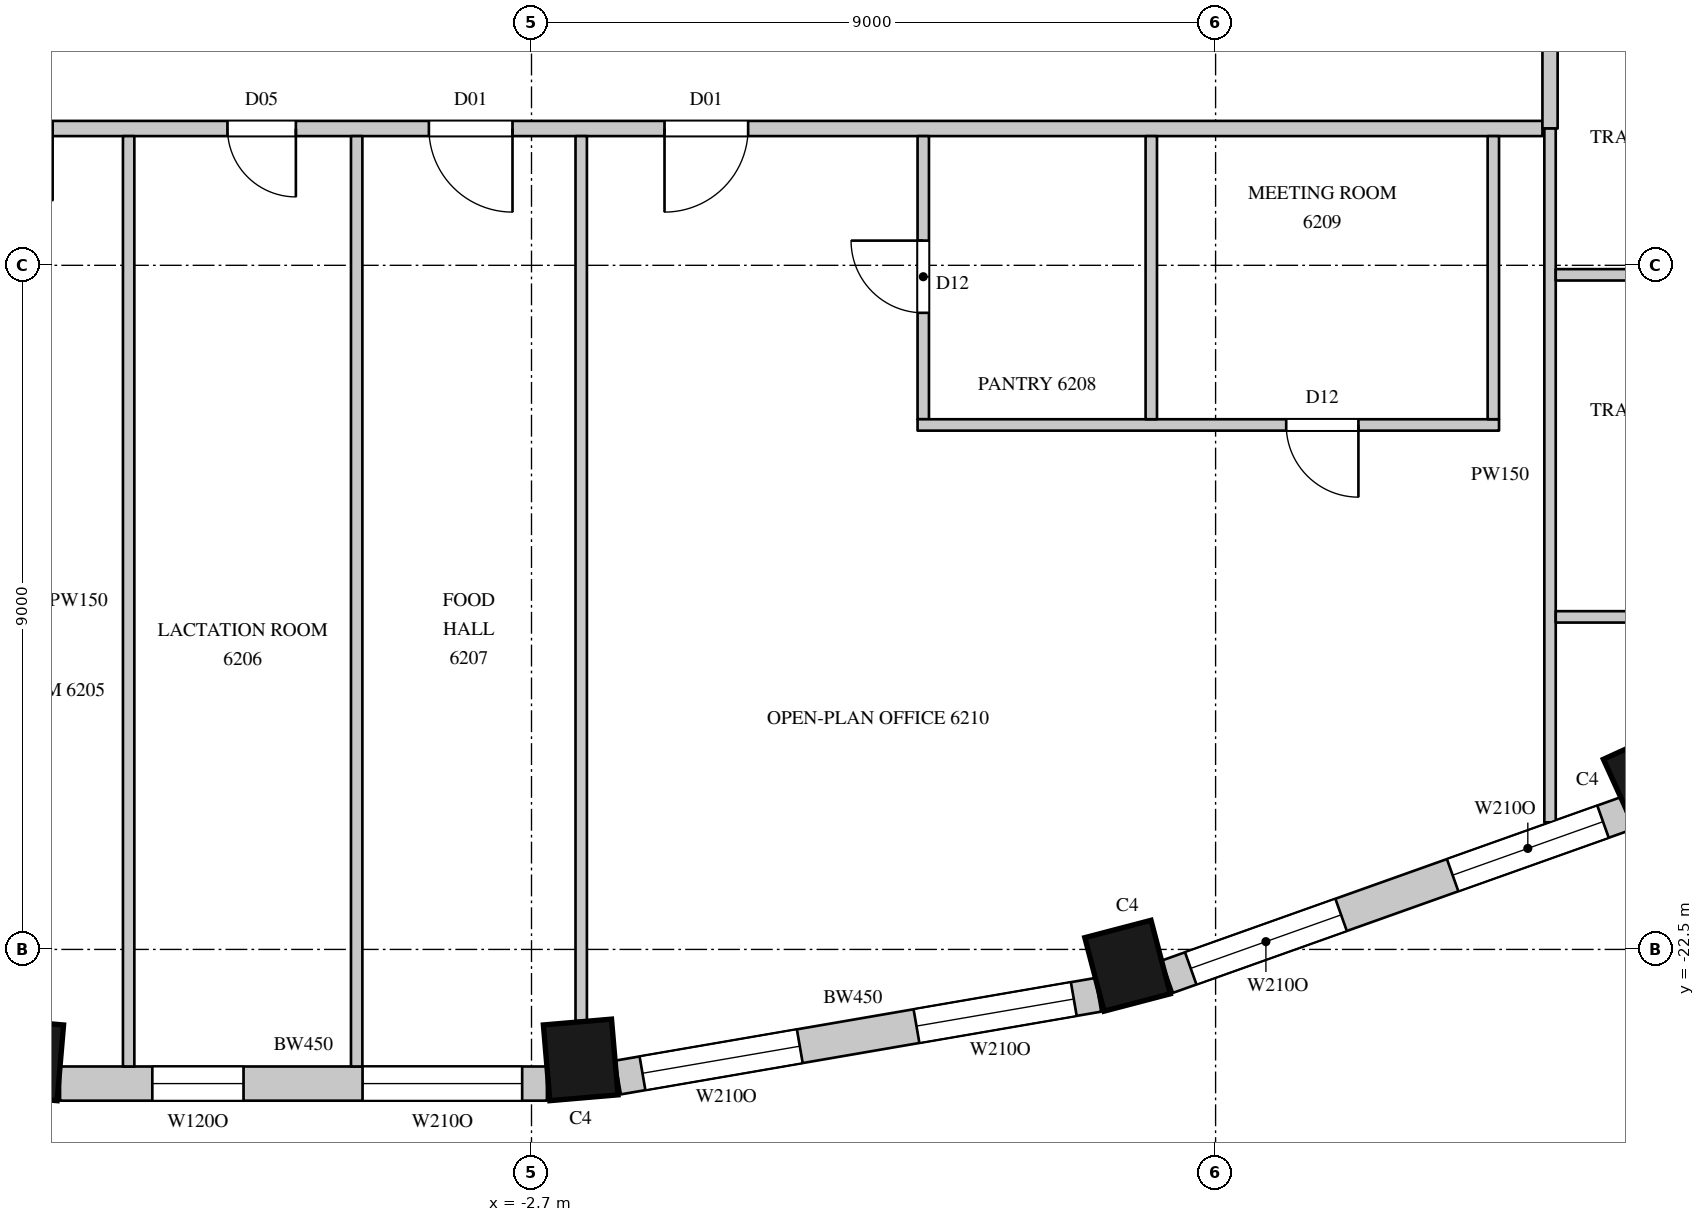
"""IFC4 building model, lengths in metres.
Left out: names, types, materials, properties, quantities, classifications, styles, units other than length and angle.
Written with IfcOpenShell. Run it as: python <this file> out.ifc"""

import sys

from ifc_helpers import new_model, si_unit, direction, frame, frame_2d, origin, origin_2d, place, context, subcontext, project, spatial, rectangle, extrude, element, fill, save


model = new_model("IFC4")
c1 = context("Model", 3, precision=1e-05, world=origin(), true_north=direction((0.0, 1.0)))
c2 = subcontext(c1, "Body", "Model", "MODEL_VIEW")
j1 = project(units=[si_unit("LENGTHUNIT", "METRE"), si_unit("PLANEANGLEUNIT", "RADIAN")], contexts=[c1])
p1 = place(None, origin())
s1 = spatial("IfcSite", under=j1, at=p1, CompositionType="ELEMENT")
p2 = place(p1, origin())
s2 = spatial("IfcBuilding", under=s1, at=p2, CompositionType="ELEMENT")
p3 = place(p2, frame((0.0, 0.0, 276.2)))
s3 = spatial("IfcBuildingStorey", under=s2, at=p3, CompositionType="ELEMENT", Elevation=276.2)
for number, where, z_axis, x_axis in (
    (1, (-9.347, -23.954, 0.0), (0.0, 0.0, 1.0), (0.996, -0.085, 0.0)),
    (2, (-2.053, -23.954, 0.0), (0.0, 0.0, 1.0), (0.996, 0.085, 0.0)),
    (3, (5.142, -22.715, 0.0), (0.0, 0.0, 1.0), (0.967, 0.253, 0.0)),
    (4, (12.019, -20.267, 0.0), (0.0, 0.0, 1.0), (0.91, 0.415, 0.0)),
):
    element("IfcColumn", number, at=place(p3, frame(where, z_axis=z_axis, x_axis=x_axis)), inside=s3, PredefinedType="COLUMN", context=c2, shape_type="SweptSolid", body=[
        extrude(rectangle(XDim=0.9, YDim=1.0, at=origin_2d()), origin(), (0.0, 0.0, 1.0), 4.1),
    ])
p4 = place(p3, frame((-8.903, -24.265, 0.0), z_axis=(0.0, 0.0, 1.0), x_axis=(1.0, 0.0, 0.0)))
e5 = element("IfcWall", 5, at=p4, inside=s3, PredefinedType="SOLIDWALL", context=c2, shape_type="SweptSolid", body=[
    extrude(rectangle(XDim=6.406, YDim=0.45, at=frame_2d((3.203, 0.0))), origin(), (0.0, 0.0, 1.0), 3.8),
])
p5 = place(p4, frame((3.98, 0.0, 1.05)))
e6 = element("IfcOpeningElement", 6, at=p5, cuts=e5, PredefinedType="OPENING", context=c2, shape_type="SweptSolid", body=[
    extrude(rectangle(XDim=2.1, YDim=2.4, at=frame_2d((1.05, 1.2))), frame((0.0, 0.235, 0.0), z_axis=(0.0, -1.0, 0.0), x_axis=(1.0, 0.0, 0.0)), (0.0, 0.0, 1.0), 0.47),
])
p6 = place(p4, frame((1.214, 0.0, 1.05)))
e7 = element("IfcOpeningElement", 7, at=p6, cuts=e5, PredefinedType="OPENING", context=c2, shape_type="SweptSolid", body=[
    extrude(rectangle(XDim=1.2, YDim=2.4, at=frame_2d((0.6, 1.2))), frame((0.0, 0.235, 0.0), z_axis=(0.0, -1.0, 0.0), x_axis=(1.0, 0.0, 0.0)), (0.0, 0.0, 1.0), 0.47),
])
p7 = place(p3, frame((-1.562, -24.185, 0.0), z_axis=(0.0, 0.0, 1.0), x_axis=(0.985502073964, 0.169663379113, 0.0)))
e8 = element("IfcWall", 8, at=p7, inside=s3, PredefinedType="SOLIDWALL", context=c2, shape_type="SweptSolid", body=[
    extrude(rectangle(XDim=6.412, YDim=0.45, at=frame_2d((3.206, 0.0))), origin(), (0.0, 0.0, 1.0), 3.8),
])
p8 = place(p7, frame((0.327, 0.0, 1.05)))
e9 = element("IfcOpeningElement", 9, at=p8, cuts=e8, PredefinedType="OPENING", context=c2, shape_type="SweptSolid", body=[
    extrude(rectangle(XDim=2.1, YDim=2.4, at=frame_2d((1.05, 1.2))), frame((0.0, 0.235, 0.0), z_axis=(0.0, -1.0, 0.0), x_axis=(1.0, 0.0, 0.0)), (0.0, 0.0, 1.0), 0.47),
])
p9 = place(p7, frame((3.985, 0.0, 1.05)))
e10 = element("IfcOpeningElement", 10, at=p9, cuts=e8, PredefinedType="OPENING", context=c2, shape_type="SweptSolid", body=[
    extrude(rectangle(XDim=2.1, YDim=2.4, at=frame_2d((1.05, 1.2))), frame((0.0, 0.235, 0.0), z_axis=(0.0, -1.0, 0.0), x_axis=(1.0, 0.0, 0.0)), (0.0, 0.0, 1.0), 0.47),
])
p10 = place(p3, frame((5.665, -22.859, 0.0), z_axis=(0.0, 0.0, 1.0), x_axis=(0.942108340262, 0.335308626803, 0.0)))
e11 = element("IfcWall", 11, at=p10, inside=s3, PredefinedType="SOLIDWALL", context=c2, shape_type="SweptSolid", body=[
    extrude(rectangle(XDim=6.412, YDim=0.45, at=frame_2d((3.206, 0.0))), origin(), (0.0, 0.0, 1.0), 3.8),
])
p11 = place(p10, frame((0.327, 0.0, 1.05)))
e12 = element("IfcOpeningElement", 12, at=p11, cuts=e11, PredefinedType="OPENING", context=c2, shape_type="SweptSolid", body=[
    extrude(rectangle(XDim=2.1, YDim=2.4, at=frame_2d((1.05, 1.2))), frame((0.0, 0.235, 0.0), z_axis=(0.0, -1.0, 0.0), x_axis=(1.0, 0.0, 0.0)), (0.0, 0.0, 1.0), 0.47),
])
p12 = place(p10, frame((3.985, 0.0, 1.05)))
e13 = element("IfcOpeningElement", 13, at=p12, cuts=e11, PredefinedType="OPENING", context=c2, shape_type="SweptSolid", body=[
    extrude(rectangle(XDim=2.1, YDim=2.4, at=frame_2d((1.05, 1.2))), frame((0.0, 0.235, 0.0), z_axis=(0.0, -1.0, 0.0), x_axis=(1.0, 0.0, 0.0)), (0.0, 0.0, 1.0), 0.47),
])
p13 = place(p3, frame((-10.9, -11.7, 0.0), z_axis=(0.0, 0.0, 1.0), x_axis=(1.0, 0.0, 0.0)))
e14 = element("IfcWall", 14, at=p13, inside=s3, PredefinedType="PARTITIONING", context=c2, shape_type="SweptSolid", body=[
    extrude(rectangle(XDim=21.5, YDim=0.2, at=frame_2d((10.75, 0.0))), origin(), (0.0, 0.0, 1.0), 3.8),
])
p14 = place(p13, frame((0.95, 0.0, 0.0)))
e15 = element("IfcOpeningElement", 15, at=p14, cuts=e14, PredefinedType="OPENING", context=c2, shape_type="SweptSolid", body=[
    extrude(rectangle(XDim=0.95, YDim=2.2, at=frame_2d((0.475, 1.1))), frame((0.0, 0.11, 0.0), z_axis=(0.0, -1.0, 0.0), x_axis=(1.0, 0.0, 0.0)), (0.0, 0.0, 1.0), 0.22),
])
p15 = place(p13, frame((4.2, 0.0, 0.0)))
e16 = element("IfcOpeningElement", 16, at=p15, cuts=e14, PredefinedType="OPENING", context=c2, shape_type="SweptSolid", body=[
    extrude(rectangle(XDim=0.9, YDim=2.2, at=frame_2d((0.45, 1.1))), frame((0.0, 0.11, 0.0), z_axis=(0.0, -1.0, 0.0), x_axis=(1.0, 0.0, 0.0)), (0.0, 0.0, 1.0), 0.22),
])
p16 = place(p13, frame((6.85, 0.0, 0.0)))
e17 = element("IfcOpeningElement", 17, at=p16, cuts=e14, PredefinedType="OPENING", context=c2, shape_type="SweptSolid", body=[
    extrude(rectangle(XDim=1.1, YDim=2.4, at=frame_2d((0.55, 1.2))), frame((0.0, 0.11, 0.0), z_axis=(0.0, -1.0, 0.0), x_axis=(1.0, 0.0, 0.0)), (0.0, 0.0, 1.0), 0.22),
])
p17 = place(p13, frame((9.95, 0.0, 0.0)))
e18 = element("IfcOpeningElement", 18, at=p17, cuts=e14, PredefinedType="OPENING", context=c2, shape_type="SweptSolid", body=[
    extrude(rectangle(XDim=1.1, YDim=2.4, at=frame_2d((0.55, 1.2))), frame((0.0, 0.11, 0.0), z_axis=(0.0, -1.0, 0.0), x_axis=(1.0, 0.0, 0.0)), (0.0, 0.0, 1.0), 0.22),
])
p18 = place(p3, frame((10.7, -11.7, 0.0), z_axis=(0.0, 0.0, 1.0), x_axis=(0.0, 1.0, 0.0)))
e19 = element("IfcWall", 19, at=p18, inside=s3, PredefinedType="PARTITIONING", context=c2, shape_type="SweptSolid", body=[
    extrude(rectangle(XDim=23.8, YDim=0.2, at=frame_2d((11.9, 0.0))), origin(), (0.0, 0.0, 1.0), 3.8),
])
p19 = place(p18, frame((12.35, 0.0, 0.0)))
e20 = element("IfcOpeningElement", 20, at=p19, cuts=e19, PredefinedType="OPENING", context=c2, shape_type="SweptSolid", body=[
    extrude(rectangle(XDim=1.5, YDim=2.4, at=frame_2d((0.75, 1.2))), frame((0.0, 0.11, 0.0), z_axis=(0.0, -1.0, 0.0), x_axis=(1.0, 0.0, 0.0)), (0.0, 0.0, 1.0), 0.22),
])
p20 = place(p18, frame((19.55, 0.0, 0.0)))
e21 = element("IfcOpeningElement", 21, at=p20, cuts=e19, PredefinedType="OPENING", context=c2, shape_type="SweptSolid", body=[
    extrude(rectangle(XDim=1.1, YDim=2.4, at=frame_2d((0.55, 1.2))), frame((0.0, 0.11, 0.0), z_axis=(0.0, -1.0, 0.0), x_axis=(1.0, 0.0, 0.0)), (0.0, 0.0, 1.0), 0.22),
])
p21 = place(p18, frame((4.25, 0.0, 0.0)))
e22 = element("IfcOpeningElement", 22, at=p21, cuts=e19, PredefinedType="OPENING", context=c2, shape_type="SweptSolid", body=[
    extrude(rectangle(XDim=1.1, YDim=2.4, at=frame_2d((0.55, 1.2))), frame((0.0, 0.11, 0.0), z_axis=(0.0, -1.0, 0.0), x_axis=(1.0, 0.0, 0.0)), (0.0, 0.0, 1.0), 0.22),
])
for number, where, z_axis, x_axis in (
    (23, (-8.0, -24.04, 0.0), (0.0, 0.0, 1.0), (0.0, 1.0, 0.0)),
    (24, (-5.0, -24.04, 0.0), (0.0, 0.0, 1.0), (0.0, 1.0, 0.0)),
):
    element("IfcWall", number, at=place(p3, frame(where, z_axis=z_axis, x_axis=x_axis)), inside=s3, PredefinedType="PARTITIONING", context=c2, shape_type="SweptSolid", body=[
        extrude(rectangle(XDim=12.24, YDim=0.15, at=frame_2d((6.12, 0.0))), origin(), (0.0, 0.0, 1.0), 3.8),
    ])
p22 = place(p3, frame((-2.046, -23.441, 0.0), z_axis=(0.0, 0.0, 1.0), x_axis=(0.0, 1.0, 0.0)))
e25 = element("IfcWall", 25, at=p22, inside=s3, PredefinedType="PARTITIONING", context=c2, shape_type="SweptSolid", body=[
    extrude(rectangle(XDim=11.641, YDim=0.15, at=frame_2d((5.821, 0.0))), origin(), (0.0, 0.0, 1.0), 3.8),
])
p23 = place(p3, frame((2.454, -15.525, 0.0), z_axis=(0.0, 0.0, 1.0), x_axis=(0.0, 1.0, 0.0)))
e26 = element("IfcWall", 26, at=p23, inside=s3, PredefinedType="PARTITIONING", context=c2, shape_type="SweptSolid", body=[
    extrude(rectangle(XDim=3.725, YDim=0.15, at=frame_2d((1.862, 0.0))), origin(), (0.0, 0.0, 1.0), 3.8),
])
p24 = place(p23, frame((1.4, 0.0, 0.0)))
e27 = element("IfcOpeningElement", 27, at=p24, cuts=e26, PredefinedType="OPENING", context=c2, shape_type="SweptSolid", body=[
    extrude(rectangle(XDim=0.95, YDim=2.2, at=frame_2d((0.475, 1.1))), frame((0.0, 0.085, 0.0), z_axis=(0.0, -1.0, 0.0), x_axis=(1.0, 0.0, 0.0)), (0.0, 0.0, 1.0), 0.17),
])
p25 = place(p3, frame((2.379, -15.6, 0.0), z_axis=(0.0, 0.0, 1.0), x_axis=(1.0, 0.0, 0.0)))
e28 = element("IfcWall", 28, at=p25, inside=s3, PredefinedType="PARTITIONING", context=c2, shape_type="SweptSolid", body=[
    extrude(rectangle(XDim=7.65, YDim=0.15, at=frame_2d((3.825, 0.0))), origin(), (0.0, 0.0, 1.0), 3.8),
])
p26 = place(p25, frame((4.85, 0.0, 0.0)))
e29 = element("IfcOpeningElement", 29, at=p26, cuts=e28, PredefinedType="OPENING", context=c2, shape_type="SweptSolid", body=[
    extrude(rectangle(XDim=0.95, YDim=2.2, at=frame_2d((0.475, 1.1))), frame((0.0, 0.085, 0.0), z_axis=(0.0, -1.0, 0.0), x_axis=(1.0, 0.0, 0.0)), (0.0, 0.0, 1.0), 0.17),
])
for number, where, z_axis, x_axis in (
    (30, (5.454, -15.525, 0.0), (0.0, 0.0, 1.0), (0.0, 1.0, 0.0)),
    (31, (9.954, -15.525, 0.0), (0.0, 0.0, 1.0), (0.0, 1.0, 0.0)),
):
    element("IfcWall", number, at=place(p3, frame(where, z_axis=z_axis, x_axis=x_axis)), inside=s3, PredefinedType="PARTITIONING", context=c2, shape_type="SweptSolid", body=[
        extrude(rectangle(XDim=3.725, YDim=0.15, at=frame_2d((1.862, 0.0))), origin(), (0.0, 0.0, 1.0), 3.8),
    ])
p27 = place(p3, frame((10.7, -20.828, 0.0), z_axis=(0.0, 0.0, 1.0), x_axis=(0.0, 1.0, 0.0)))
e32 = element("IfcWall", 32, at=p27, inside=s3, PredefinedType="PARTITIONING", context=c2, shape_type="SweptSolid", body=[
    extrude(rectangle(XDim=9.128, YDim=0.15, at=frame_2d((4.564, 0.0))), origin(), (0.0, 0.0, 1.0), 3.8),
])
p28 = place(p3, frame((10.775, -18.125, 0.0), z_axis=(0.0, 0.0, 1.0), x_axis=(1.0, 0.0, 0.0)))
e33 = element("IfcWall", 33, at=p28, inside=s3, PredefinedType="PARTITIONING", context=c2, shape_type="SweptSolid", body=[
    extrude(rectangle(XDim=3.9, YDim=0.15, at=frame_2d((1.95, 0.0))), origin(), (0.0, 0.0, 1.0), 3.8),
])
p29 = place(p28, frame((2.7, 0.0, 0.0)))
e34 = element("IfcOpeningElement", 34, at=p29, cuts=e33, PredefinedType="OPENING", context=c2, shape_type="SweptSolid", body=[
    extrude(rectangle(XDim=0.95, YDim=2.2, at=frame_2d((0.475, 1.1))), frame((0.0, 0.085, 0.0), z_axis=(0.0, -1.0, 0.0), x_axis=(1.0, 0.0, 0.0)), (0.0, 0.0, 1.0), 0.17),
])
p30 = place(p3, frame((10.775, -13.625, 0.0), z_axis=(0.0, 0.0, 1.0), x_axis=(1.0, 0.0, 0.0)))
e35 = element("IfcWall", 35, at=p30, inside=s3, PredefinedType="PARTITIONING", context=c2, shape_type="SweptSolid", body=[
    extrude(rectangle(XDim=3.75, YDim=0.15, at=frame_2d((1.875, 0.0))), origin(), (0.0, 0.0, 1.0), 3.8),
])
p31 = place(p5, origin())
e36 = element("IfcWindow", 36, at=p31, inside=s3, PartitioningType="SINGLE_PANEL", PredefinedType="WINDOW", context=c2, shape_type="SweptSolid", body=[
    extrude(rectangle(XDim=2.1, YDim=2.4, at=frame_2d((1.05, 1.2))), frame((0.0, 0.135, 0.0), z_axis=(0.0, -1.0, 0.0), x_axis=(1.0, 0.0, 0.0)), (0.0, 0.0, 1.0), 0.06),
])
fill(e6, e36)
p32 = place(p8, origin())
e37 = element("IfcWindow", 37, at=p32, inside=s3, PartitioningType="SINGLE_PANEL", PredefinedType="WINDOW", context=c2, shape_type="SweptSolid", body=[
    extrude(rectangle(XDim=2.1, YDim=2.4, at=frame_2d((1.05, 1.2))), frame((0.0, 0.135, 0.0), z_axis=(0.0, -1.0, 0.0), x_axis=(1.0, 0.0, 0.0)), (0.0, 0.0, 1.0), 0.06),
])
fill(e9, e37)
p33 = place(p9, origin())
e38 = element("IfcWindow", 38, at=p33, inside=s3, PartitioningType="SINGLE_PANEL", PredefinedType="WINDOW", context=c2, shape_type="SweptSolid", body=[
    extrude(rectangle(XDim=2.1, YDim=2.4, at=frame_2d((1.05, 1.2))), frame((0.0, 0.135, 0.0), z_axis=(0.0, -1.0, 0.0), x_axis=(1.0, 0.0, 0.0)), (0.0, 0.0, 1.0), 0.06),
])
fill(e10, e38)
p34 = place(p11, origin())
e39 = element("IfcWindow", 39, at=p34, inside=s3, PartitioningType="SINGLE_PANEL", PredefinedType="WINDOW", context=c2, shape_type="SweptSolid", body=[
    extrude(rectangle(XDim=2.1, YDim=2.4, at=frame_2d((1.05, 1.2))), frame((0.0, 0.135, 0.0), z_axis=(0.0, -1.0, 0.0), x_axis=(1.0, 0.0, 0.0)), (0.0, 0.0, 1.0), 0.06),
])
fill(e12, e39)
p35 = place(p12, origin())
e40 = element("IfcWindow", 40, at=p35, inside=s3, PartitioningType="SINGLE_PANEL", PredefinedType="WINDOW", context=c2, shape_type="SweptSolid", body=[
    extrude(rectangle(XDim=2.1, YDim=2.4, at=frame_2d((1.05, 1.2))), frame((0.0, 0.135, 0.0), z_axis=(0.0, -1.0, 0.0), x_axis=(1.0, 0.0, 0.0)), (0.0, 0.0, 1.0), 0.06),
])
fill(e13, e40)
p36 = place(p14, origin())
e41 = element("IfcDoor", 41, at=p36, inside=s3, OperationType="SINGLE_SWING_LEFT", PredefinedType="DOOR", context=c2, shape_type="SweptSolid", body=[
    extrude(rectangle(XDim=0.95, YDim=2.2, at=frame_2d((0.475, 1.1))), frame((0.0, 0.025, 0.0), z_axis=(0.0, -1.0, 0.0), x_axis=(1.0, 0.0, 0.0)), (0.0, 0.0, 1.0), 0.05),
])
fill(e15, e41)
p37 = place(p15, origin())
e42 = element("IfcDoor", 42, at=p37, inside=s3, OperationType="SINGLE_SWING_LEFT", PredefinedType="DOOR", context=c2, shape_type="SweptSolid", body=[
    extrude(rectangle(XDim=0.9, YDim=2.2, at=frame_2d((0.45, 1.1))), frame((0.0, 0.025, 0.0), z_axis=(0.0, -1.0, 0.0), x_axis=(1.0, 0.0, 0.0)), (0.0, 0.0, 1.0), 0.05),
])
fill(e16, e42)
p38 = place(p16, origin())
e43 = element("IfcDoor", 43, at=p38, inside=s3, OperationType="SINGLE_SWING_LEFT", PredefinedType="DOOR", context=c2, shape_type="SweptSolid", body=[
    extrude(rectangle(XDim=1.1, YDim=2.4, at=frame_2d((0.55, 1.2))), frame((0.0, 0.025, 0.0), z_axis=(0.0, -1.0, 0.0), x_axis=(1.0, 0.0, 0.0)), (0.0, 0.0, 1.0), 0.05),
])
fill(e17, e43)
p39 = place(p17, origin())
e44 = element("IfcDoor", 44, at=p39, inside=s3, OperationType="SINGLE_SWING_RIGHT", PredefinedType="DOOR", context=c2, shape_type="SweptSolid", body=[
    extrude(rectangle(XDim=1.1, YDim=2.4, at=frame_2d((0.55, 1.2))), frame((0.0, 0.025, 0.0), z_axis=(0.0, -1.0, 0.0), x_axis=(1.0, 0.0, 0.0)), (0.0, 0.0, 1.0), 0.05),
])
fill(e18, e44)
p40 = place(p24, origin())
e45 = element("IfcDoor", 45, at=p40, inside=s3, OperationType="SINGLE_SWING_RIGHT", PredefinedType="DOOR", context=c2, shape_type="SweptSolid", body=[
    extrude(rectangle(XDim=0.95, YDim=2.2, at=frame_2d((0.475, 1.1))), frame((0.0, 0.025, 0.0), z_axis=(0.0, -1.0, 0.0), x_axis=(1.0, 0.0, 0.0)), (0.0, 0.0, 1.0), 0.05),
])
fill(e27, e45)
p41 = place(p26, origin())
e46 = element("IfcDoor", 46, at=p41, inside=s3, OperationType="SINGLE_SWING_LEFT", PredefinedType="DOOR", context=c2, shape_type="SweptSolid", body=[
    extrude(rectangle(XDim=0.95, YDim=2.2, at=frame_2d((0.475, 1.1))), frame((0.0, 0.025, 0.0), z_axis=(0.0, -1.0, 0.0), x_axis=(1.0, 0.0, 0.0)), (0.0, 0.0, 1.0), 0.05),
])
fill(e29, e46)
p42 = place(p6, origin())
e47 = element("IfcWindow", 47, at=p42, inside=s3, PartitioningType="SINGLE_PANEL", PredefinedType="WINDOW", context=c2, shape_type="SweptSolid", body=[
    extrude(rectangle(XDim=1.2, YDim=2.4, at=frame_2d((0.6, 1.2))), frame((0.0, 0.135, 0.0), z_axis=(0.0, -1.0, 0.0), x_axis=(1.0, 0.0, 0.0)), (0.0, 0.0, 1.0), 0.06),
])
fill(e7, e47)
save(model, sys.argv[1])
